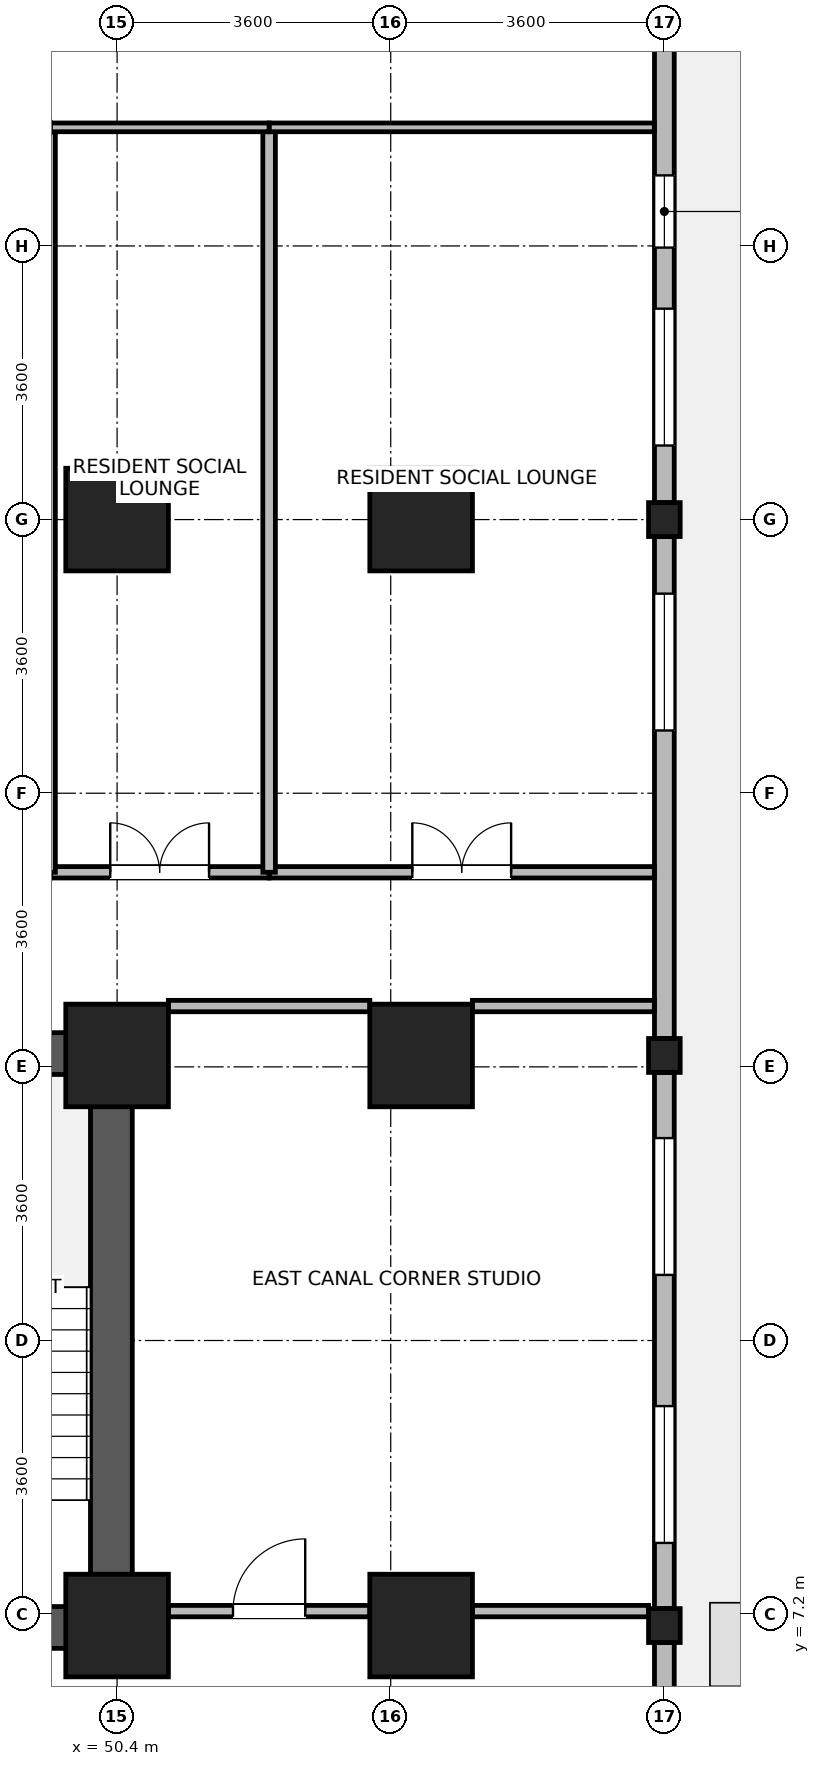
"""IFC4 building model, lengths in metres.
Left out: names, types, materials, properties, quantities, classifications, styles, units other than length and angle.
Written with IfcOpenShell. Run it as: python <this file> out.ifc"""

import sys

from ifc_helpers import new_model, si_unit, direction, frame, frame_2d, origin, origin_2d, place, context, subcontext, project, spatial, rectangle, i_section, extrude, source, transform, mapped, element, fill, save


model = new_model("IFC4")
c1 = context("Model", 3, precision=1e-05, world=origin(), true_north=direction((0.0, 1.0)))
c2 = subcontext(c1, "Body", "Model", "MODEL_VIEW")
j1 = project(units=[si_unit("LENGTHUNIT", "METRE"), si_unit("PLANEANGLEUNIT", "RADIAN")], contexts=[c1])
p1 = place(None, origin())
s1 = spatial("IfcSite", under=j1, at=p1, CompositionType="ELEMENT")
p2 = place(p1, origin())
s2 = spatial("IfcBuilding", under=s1, at=p2, CompositionType="ELEMENT")
p3 = place(p2, frame((0.0, 0.0, 29.0)))
s3 = spatial("IfcBuildingStorey", under=s2, at=p3, CompositionType="ELEMENT", Elevation=29.0)
p4 = place(p3, frame((50.325, 6.75, 0.0), z_axis=(0.0, 0.0, 1.0), x_axis=(0.0, 1.0, 0.0)))
e1 = element("IfcWall", 1, at=p4, inside=s3, PredefinedType="SHEAR", context=c2, shape_type="SweptSolid", body=[
    extrude(rectangle(XDim=8.1, YDim=0.55, at=frame_2d((4.05, 0.0))), origin(), (0.0, 0.0, 1.0), 3.45),
])
for number, where, z_axis, x_axis in (
    (2, (46.85, 7.025, 0.0), (0.0, 0.0, 1.0), (1.0, 0.0, 0.0)),
    (3, (46.85, 14.575, 0.0), (0.0, 0.0, 1.0), (1.0, 0.0, 0.0)),
):
    element("IfcWall", number, at=place(p3, frame(where, z_axis=z_axis, x_axis=x_axis)), inside=s3, PredefinedType="SHEAR", context=c2, shape_type="SweptSolid", body=[
        extrude(rectangle(XDim=3.2, YDim=0.55, at=frame_2d((1.6, 0.0))), origin(), (0.0, 0.0, 1.0), 3.45),
    ])
m1 = source(origin(), c2, "Body", "SweptSolid", [
    extrude(rectangle(XDim=1.35, YDim=1.35, at=origin_2d()), origin(), (0.0, 0.0, 1.0), 3.7),
])
for number, where, z_axis, x_axis in (
    (4, (50.4, 7.05, 0.0), (0.0, 0.0, 1.0), (1.0, 0.0, 0.0)),
    (5, (50.4, 14.55, 0.0), (0.0, 0.0, 1.0), (1.0, 0.0, 0.0)),
    (6, (50.4, 21.6, 0.0), (0.0, 0.0, 1.0), (1.0, 0.0, 0.0)),
    (7, (54.4, 7.05, 0.0), (0.0, 0.0, 1.0), (1.0, 0.0, 0.0)),
    (8, (54.4, 14.55, 0.0), (0.0, 0.0, 1.0), (1.0, 0.0, 0.0)),
    (9, (54.4, 21.6, 0.0), (0.0, 0.0, 1.0), (1.0, 0.0, 0.0)),
):
    element("IfcColumn", number, at=place(p3, frame(where, z_axis=z_axis, x_axis=x_axis)), inside=s3, PredefinedType="COLUMN", context=c2, shape_type="MappedRepresentation", body=[
        mapped(m1, transform((0.0, 0.0, 0.0), x_axis=(1.0, 0.0, 0.0), y_axis=(0.0, 1.0, 0.0), z_axis=(0.0, 0.0, 1.0), scale=1.0)),
    ])
m2 = source(origin(), c2, "Body", "SweptSolid", [
    extrude(i_section(OverallWidth=0.416, OverallDepth=0.446, WebThickness=0.029, FlangeThickness=0.04, FilletRadius=0.015, at=origin_2d()), origin(), (0.0, 0.0, 1.0), 3.7),
])
for number, where, z_axis, x_axis in (
    (10, (57.6, 7.05, 0.0), (0.0, 0.0, 1.0), (1.0, 0.0, 0.0)),
    (11, (57.6, 14.55, 0.0), (0.0, 0.0, 1.0), (1.0, 0.0, 0.0)),
    (12, (57.6, 21.6, 0.0), (0.0, 0.0, 1.0), (1.0, 0.0, 0.0)),
):
    element("IfcColumn", number, at=place(p3, frame(where, z_axis=z_axis, x_axis=x_axis)), inside=s3, PredefinedType="COLUMN", context=c2, shape_type="MappedRepresentation", body=[
        mapped(m2, transform((0.0, 0.0, 0.0), x_axis=(1.0, 0.0, 0.0), y_axis=(0.0, 1.0, 0.0), z_axis=(0.0, 0.0, 1.0), scale=1.0)),
    ])
p5 = place(p3, frame((57.6, 6.826, 0.0), z_axis=(0.0, 0.0, 1.0), x_axis=(0.0, -1.0, 0.0)))
e13 = element("IfcWall", 13, at=p5, inside=s3, PredefinedType="STANDARD", context=c2, shape_type="SweptSolid", body=[
    extrude(rectangle(XDim=5.156, YDim=0.26, at=frame_2d((2.578, 0.0))), origin(), (0.0, 0.0, 1.0), 3.43),
])
p6 = place(p5, frame((2.859, 0.0, 0.0)))
e14 = element("IfcOpeningElement", 14, at=p6, cuts=e13, PredefinedType="OPENING", context=c2, shape_type="SweptSolid", body=[
    extrude(rectangle(XDim=1.5, YDim=2.15, at=frame_2d((0.75, 1.075))), frame((0.0, 0.14, 0.0), z_axis=(0.0, -1.0, 0.0), x_axis=(1.0, 0.0, 0.0)), (0.0, 0.0, 1.0), 0.28),
])
p7 = place(p3, frame((57.6, 14.326, 0.0), z_axis=(0.0, 0.0, 1.0), x_axis=(0.0, -1.0, 0.0)))
e15 = element("IfcWall", 15, at=p7, inside=s3, PredefinedType="STANDARD", context=c2, shape_type="SweptSolid", body=[
    extrude(rectangle(XDim=7.052, YDim=0.26, at=frame_2d((3.526, 0.0))), origin(), (0.0, 0.0, 1.0), 2.93),
])
p8 = place(p7, frame((0.863, 0.0, 0.85)))
e16 = element("IfcOpeningElement", 16, at=p8, cuts=e15, PredefinedType="OPENING", context=c2, shape_type="SweptSolid", body=[
    extrude(rectangle(XDim=1.8, YDim=1.85, at=frame_2d((0.9, 0.925))), frame((0.0, 0.14, 0.0), z_axis=(0.0, -1.0, 0.0), x_axis=(1.0, 0.0, 0.0)), (0.0, 0.0, 1.0), 0.28),
])
p9 = place(p7, frame((4.389, 0.0, 0.85)))
e17 = element("IfcOpeningElement", 17, at=p9, cuts=e15, PredefinedType="OPENING", context=c2, shape_type="SweptSolid", body=[
    extrude(rectangle(XDim=1.8, YDim=1.85, at=frame_2d((0.9, 0.925))), frame((0.0, 0.14, 0.0), z_axis=(0.0, -1.0, 0.0), x_axis=(1.0, 0.0, 0.0)), (0.0, 0.0, 1.0), 0.28),
])
p10 = place(p3, frame((57.6, 21.376, 0.0), z_axis=(0.0, 0.0, 1.0), x_axis=(0.0, -1.0, 0.0)))
e18 = element("IfcWall", 18, at=p10, inside=s3, PredefinedType="STANDARD", context=c2, shape_type="SweptSolid", body=[
    extrude(rectangle(XDim=6.602, YDim=0.26, at=frame_2d((3.301, 0.0))), origin(), (0.0, 0.0, 1.0), 2.93),
])
p11 = place(p10, frame((0.75, 0.0, 0.85)))
e19 = element("IfcOpeningElement", 19, at=p11, cuts=e18, PredefinedType="OPENING", context=c2, shape_type="SweptSolid", body=[
    extrude(rectangle(XDim=1.8, YDim=1.85, at=frame_2d((0.9, 0.925))), frame((0.0, 0.14, 0.0), z_axis=(0.0, -1.0, 0.0), x_axis=(1.0, 0.0, 0.0)), (0.0, 0.0, 1.0), 0.28),
])
p12 = place(p3, frame((57.6, 28.426, 0.0), z_axis=(0.0, 0.0, 1.0), x_axis=(0.0, -1.0, 0.0)))
e20 = element("IfcWall", 20, at=p12, inside=s3, PredefinedType="STANDARD", context=c2, shape_type="SweptSolid", body=[
    extrude(rectangle(XDim=6.602, YDim=0.26, at=frame_2d((3.301, 0.0))), origin(), (0.0, 0.0, 1.0), 2.93),
])
p13 = place(p12, frame((4.052, 0.0, 0.85)))
e21 = element("IfcOpeningElement", 21, at=p13, cuts=e20, PredefinedType="OPENING", context=c2, shape_type="SweptSolid", body=[
    extrude(rectangle(XDim=1.8, YDim=1.85, at=frame_2d((0.9, 0.925))), frame((0.0, 0.14, 0.0), z_axis=(0.0, -1.0, 0.0), x_axis=(1.0, 0.0, 0.0)), (0.0, 0.0, 1.0), 0.28),
])
p14 = place(p12, frame((2.298, 0.0, 0.85)))
e22 = element("IfcOpeningElement", 22, at=p14, cuts=e20, PredefinedType="OPENING", context=c2, shape_type="SweptSolid", body=[
    extrude(rectangle(XDim=0.95, YDim=1.75, at=frame_2d((0.475, 0.875))), frame((0.0, 0.14, 0.0), z_axis=(0.0, -1.0, 0.0), x_axis=(1.0, 0.0, 0.0)), (0.0, 0.0, 1.0), 0.28),
])
p15 = place(p3, frame((51.075, 7.24, 0.0), z_axis=(0.0, 0.0, 1.0), x_axis=(1.0, 0.0, 0.0)))
e23 = element("IfcWall", 23, at=p15, inside=s3, PredefinedType="PARTITIONING", context=c2, shape_type="SweptSolid", body=[
    extrude(rectangle(XDim=2.65, YDim=0.15, at=frame_2d((1.325, 0.0))), origin(), (0.0, 0.0, 1.0), 2.78),
])
p16 = place(p15, frame((0.85, 0.0, 0.0)))
e24 = element("IfcOpeningElement", 24, at=p16, cuts=e23, PredefinedType="OPENING", context=c2, shape_type="SweptSolid", body=[
    extrude(rectangle(XDim=0.95, YDim=2.1, at=frame_2d((0.475, 1.05))), frame((0.0, 0.085, 0.0), z_axis=(0.0, -1.0, 0.0), x_axis=(1.0, 0.0, 0.0)), (0.0, 0.0, 1.0), 0.17),
])
p17 = place(p3, frame((55.075, 7.24, 0.0), z_axis=(0.0, 0.0, 1.0), x_axis=(1.0, 0.0, 0.0)))
e25 = element("IfcWall", 25, at=p17, inside=s3, PredefinedType="PARTITIONING", context=c2, shape_type="SweptSolid", body=[
    extrude(rectangle(XDim=2.317, YDim=0.15, at=frame_2d((1.159, 0.0))), origin(), (0.0, 0.0, 1.0), 2.78),
])
p18 = place(p3, frame((51.075, 15.2, 0.0), z_axis=(0.0, 0.0, 1.0), x_axis=(1.0, 0.0, 0.0)))
e26 = element("IfcWall", 26, at=p18, inside=s3, PredefinedType="PARTITIONING", context=c2, shape_type="SweptSolid", body=[
    extrude(rectangle(XDim=2.65, YDim=0.15, at=frame_2d((1.325, 0.0))), origin(), (0.0, 0.0, 1.0), 3.43),
])
p19 = place(p3, frame((55.075, 15.2, 0.0), z_axis=(0.0, 0.0, 1.0), x_axis=(1.0, 0.0, 0.0)))
e27 = element("IfcWall", 27, at=p19, inside=s3, PredefinedType="PARTITIONING", context=c2, shape_type="SweptSolid", body=[
    extrude(rectangle(XDim=2.393, YDim=0.15, at=frame_2d((1.197, 0.0))), origin(), (0.0, 0.0, 1.0), 3.43),
])
p20 = place(p3, frame((52.4, 16.96, 0.0), z_axis=(0.0, 0.0, 1.0), x_axis=(1.0, 0.0, 0.0)))
e28 = element("IfcWall", 28, at=p20, inside=s3, PredefinedType="PARTITIONING", context=c2, shape_type="SweptSolid", body=[
    extrude(rectangle(XDim=5.068, YDim=0.15, at=frame_2d((2.534, 0.0))), origin(), (0.0, 0.0, 1.0), 3.43),
])
p21 = place(p20, frame((1.884, 0.0, 0.0)))
e29 = element("IfcOpeningElement", 29, at=p21, cuts=e28, PredefinedType="OPENING", context=c2, shape_type="SweptSolid", body=[
    extrude(rectangle(XDim=1.3, YDim=2.12, at=frame_2d((0.65, 1.06))), frame((0.0, 0.085, 0.0), z_axis=(0.0, -1.0, 0.0), x_axis=(1.0, 0.0, 0.0)), (0.0, 0.0, 1.0), 0.17),
])
p22 = place(p3, frame((49.52, 16.96, 0.0), z_axis=(0.0, 0.0, 1.0), x_axis=(1.0, 0.0, 0.0)))
e30 = element("IfcWall", 30, at=p22, inside=s3, PredefinedType="PARTITIONING", context=c2, shape_type="SweptSolid", body=[
    extrude(rectangle(XDim=2.88, YDim=0.15, at=frame_2d((1.44, 0.0))), origin(), (0.0, 0.0, 1.0), 3.43),
])
p23 = place(p22, frame((0.79, 0.0, 0.0)))
e31 = element("IfcOpeningElement", 31, at=p23, cuts=e30, PredefinedType="OPENING", context=c2, shape_type="SweptSolid", body=[
    extrude(rectangle(XDim=1.3, YDim=2.12, at=frame_2d((0.65, 1.06))), frame((0.0, 0.085, 0.0), z_axis=(0.0, -1.0, 0.0), x_axis=(1.0, 0.0, 0.0)), (0.0, 0.0, 1.0), 0.17),
])
p24 = place(p3, frame((49.52, 16.96, 0.0), z_axis=(0.0, 0.0, 1.0), x_axis=(0.0, 1.0, 0.0)))
e32 = element("IfcWall", 32, at=p24, inside=s3, PredefinedType="PARTITIONING", context=c2, shape_type="SweptSolid", body=[
    extrude(rectangle(XDim=9.8, YDim=0.135, at=frame_2d((4.9, 0.0))), origin(), (0.0, 0.0, 1.0), 3.43),
])
p25 = place(p3, frame((52.4, 16.96, 0.0), z_axis=(0.0, 0.0, 1.0), x_axis=(0.0, 1.0, 0.0)))
e33 = element("IfcWall", 33, at=p25, inside=s3, PredefinedType="PARTITIONING", context=c2, shape_type="SweptSolid", body=[
    extrude(rectangle(XDim=9.8, YDim=0.165, at=frame_2d((4.9, 0.0))), origin(), (0.0, 0.0, 1.0), 3.43),
])
p26 = place(p3, frame((52.4, 26.76, 0.0), z_axis=(0.0, 0.0, 1.0), x_axis=(1.0, 0.0, 0.0)))
e34 = element("IfcWall", 34, at=p26, inside=s3, PredefinedType="PARTITIONING", context=c2, shape_type="SweptSolid", body=[
    extrude(rectangle(XDim=5.068, YDim=0.115, at=frame_2d((2.534, 0.0))), origin(), (0.0, 0.0, 1.0), 3.43),
])
p27 = place(p3, frame((49.52, 26.76, 0.0), z_axis=(0.0, 0.0, 1.0), x_axis=(1.0, 0.0, 0.0)))
e35 = element("IfcWall", 35, at=p27, inside=s3, PredefinedType="PARTITIONING", context=c2, shape_type="SweptSolid", body=[
    extrude(rectangle(XDim=2.88, YDim=0.115, at=frame_2d((1.44, 0.0))), origin(), (0.0, 0.0, 1.0), 3.43),
])
p28 = place(p8, origin())
e36 = element("IfcWindow", 36, at=p28, inside=s3, PartitioningType="SINGLE_PANEL", PredefinedType="WINDOW", context=c2, shape_type="SweptSolid", body=[
    extrude(rectangle(XDim=1.8, YDim=1.85, at=frame_2d((0.9, 0.925))), frame((0.0, 0.03, 0.0), z_axis=(0.0, -1.0, 0.0), x_axis=(1.0, 0.0, 0.0)), (0.0, 0.0, 1.0), 0.06),
])
fill(e16, e36)
p29 = place(p9, origin())
e37 = element("IfcWindow", 37, at=p29, inside=s3, PartitioningType="SINGLE_PANEL", PredefinedType="WINDOW", context=c2, shape_type="SweptSolid", body=[
    extrude(rectangle(XDim=1.8, YDim=1.85, at=frame_2d((0.9, 0.925))), frame((0.0, 0.03, 0.0), z_axis=(0.0, -1.0, 0.0), x_axis=(1.0, 0.0, 0.0)), (0.0, 0.0, 1.0), 0.06),
])
fill(e17, e37)
p30 = place(p11, origin())
e38 = element("IfcWindow", 38, at=p30, inside=s3, PartitioningType="SINGLE_PANEL", PredefinedType="WINDOW", context=c2, shape_type="SweptSolid", body=[
    extrude(rectangle(XDim=1.8, YDim=1.85, at=frame_2d((0.9, 0.925))), frame((0.0, 0.03, 0.0), z_axis=(0.0, -1.0, 0.0), x_axis=(1.0, 0.0, 0.0)), (0.0, 0.0, 1.0), 0.06),
])
fill(e19, e38)
p31 = place(p13, origin())
e39 = element("IfcWindow", 39, at=p31, inside=s3, PartitioningType="SINGLE_PANEL", PredefinedType="WINDOW", context=c2, shape_type="SweptSolid", body=[
    extrude(rectangle(XDim=1.8, YDim=1.85, at=frame_2d((0.9, 0.925))), frame((0.0, 0.03, 0.0), z_axis=(0.0, -1.0, 0.0), x_axis=(1.0, 0.0, 0.0)), (0.0, 0.0, 1.0), 0.06),
])
fill(e21, e39)
p32 = place(p14, origin())
e40 = element("IfcWindow", 40, at=p32, inside=s3, PartitioningType="SINGLE_PANEL", PredefinedType="WINDOW", context=c2, shape_type="SweptSolid", body=[
    extrude(rectangle(XDim=0.95, YDim=1.75, at=frame_2d((0.475, 0.875))), frame((0.0, 0.03, 0.0), z_axis=(0.0, -1.0, 0.0), x_axis=(1.0, 0.0, 0.0)), (0.0, 0.0, 1.0), 0.06),
])
fill(e22, e40)
p33 = place(p16, origin())
e41 = element("IfcDoor", 41, at=p33, inside=s3, OperationType="SINGLE_SWING_RIGHT", PredefinedType="DOOR", context=c2, shape_type="SweptSolid", body=[
    extrude(rectangle(XDim=0.95, YDim=2.1, at=frame_2d((0.475, 1.05))), frame((0.0, 0.025, 0.0), z_axis=(0.0, -1.0, 0.0), x_axis=(1.0, 0.0, 0.0)), (0.0, 0.0, 1.0), 0.05),
])
fill(e24, e41)
p34 = place(p21, origin())
e42 = element("IfcDoor", 42, at=p34, inside=s3, OperationType="DOUBLE_DOOR_SINGLE_SWING", PredefinedType="DOOR", context=c2, shape_type="SweptSolid", body=[
    extrude(rectangle(XDim=1.3, YDim=2.12, at=frame_2d((0.65, 1.06))), frame((0.0, 0.025, 0.0), z_axis=(0.0, -1.0, 0.0), x_axis=(1.0, 0.0, 0.0)), (0.0, 0.0, 1.0), 0.05),
])
fill(e29, e42)
p35 = place(p23, origin())
e43 = element("IfcDoor", 43, at=p35, inside=s3, OperationType="DOUBLE_DOOR_SINGLE_SWING", PredefinedType="DOOR", context=c2, shape_type="SweptSolid", body=[
    extrude(rectangle(XDim=1.3, YDim=2.12, at=frame_2d((0.65, 1.06))), frame((0.0, 0.025, 0.0), z_axis=(0.0, -1.0, 0.0), x_axis=(1.0, 0.0, 0.0)), (0.0, 0.0, 1.0), 0.05),
])
fill(e31, e43)
save(model, sys.argv[1])
